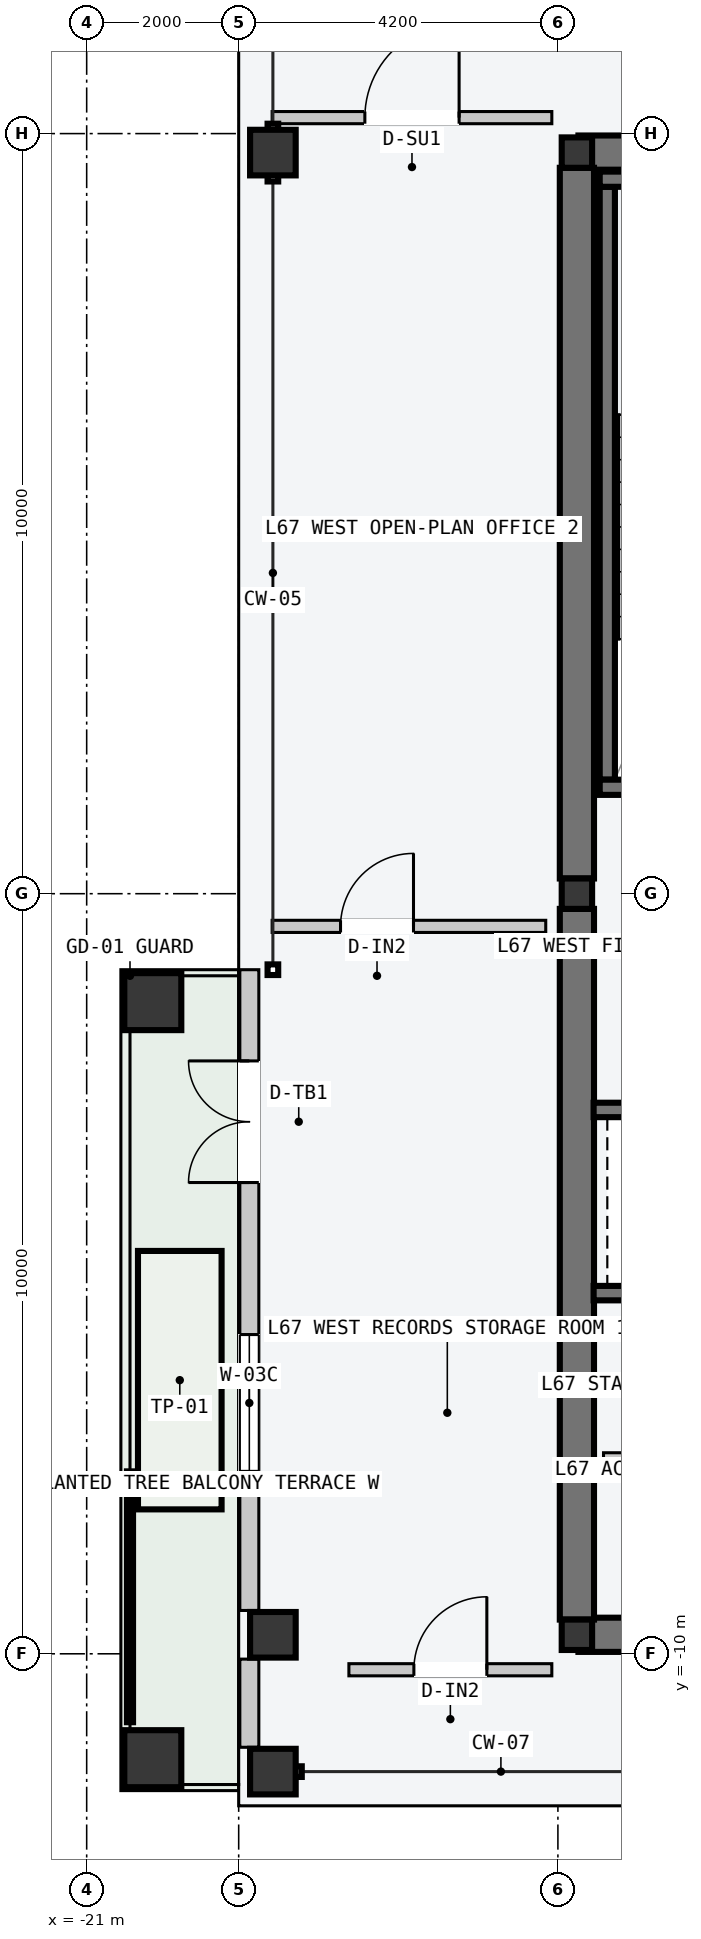
"""IFC4 building model, lengths in metres.
Left out: names, types, materials, properties, quantities, classifications, styles, units other than length and angle.
Written with IfcOpenShell. Run it as: python <this file> out.ifc"""

import sys

from ifc_helpers import new_model, si_unit, direction, frame, frame_2d, origin, origin_2d, place, context, subcontext, project, spatial, rectangle, hollow_rectangle, i_section, extrude, element, fill, save


model = new_model("IFC4")
c1 = context("Model", 3, precision=1e-05, world=origin(), true_north=direction((0.0, 1.0)))
c2 = subcontext(c1, "Body", "Model", "MODEL_VIEW")
j1 = project(units=[si_unit("LENGTHUNIT", "METRE"), si_unit("PLANEANGLEUNIT", "RADIAN")], contexts=[c1])
p1 = place(None, origin())
s1 = spatial("IfcSite", under=j1, at=p1, CompositionType="ELEMENT")
p2 = place(p1, origin())
s2 = spatial("IfcBuilding", under=s1, at=p2, CompositionType="ELEMENT")
p3 = place(p2, frame((0.0, 0.0, 254.4)))
s3 = spatial("IfcBuildingStorey", under=s2, at=p3, CompositionType="ELEMENT", Elevation=254.4)
for number, where, z_axis, x_axis in (
    (1, (-14.53, -9.75, -0.2), (0.0, 0.0, 1.0), (1.0, 0.0, 0.0)),
    (2, (-14.53, 9.75, -0.2), (0.0, 0.0, 1.0), (1.0, 0.0, 0.0)),
):
    element("IfcWall", number, at=place(p3, frame(where, z_axis=z_axis, x_axis=x_axis)), inside=s3, PredefinedType="SHEAR", context=c2, shape_type="SweptSolid", body=[
        extrude(rectangle(XDim=6.46, YDim=0.45, at=frame_2d((3.23, 0.0))), origin(), (0.0, 0.0, 1.0), 3.6),
    ])
for number, where, z_axis, x_axis in (
    (3, (-14.55, -9.55, -0.2), (0.0, 0.0, 1.0), (0.0, 1.0, 0.0)),
    (4, (-14.55, 0.2, -0.2), (0.0, 0.0, 1.0), (0.0, 1.0, 0.0)),
):
    element("IfcWall", number, at=place(p3, frame(where, z_axis=z_axis, x_axis=x_axis)), inside=s3, PredefinedType="SHEAR", context=c2, shape_type="SweptSolid", body=[
        extrude(rectangle(XDim=9.35, YDim=0.45, at=frame_2d((4.675, 0.0))), origin(), (0.0, 0.0, 1.0), 3.6),
    ])
p4 = place(p3, frame((-14.15, 1.5, -0.2), z_axis=(0.0, 0.0, 1.0), x_axis=(0.0, 1.0, 0.0)))
e5 = element("IfcWall", 5, at=p4, inside=s3, PredefinedType="SOLIDWALL", context=c2, shape_type="SweptSolid", body=[
    extrude(rectangle(XDim=7.8, YDim=0.2, at=frame_2d((3.9, 0.0))), origin(), (0.0, 0.0, 1.0), 3.6),
])
p5 = place(p3, frame((-14.25, 1.4, -0.2), z_axis=(0.0, 0.0, 1.0), x_axis=(1.0, 0.0, 0.0)))
e6 = element("IfcWall", 6, at=p5, inside=s3, PredefinedType="SOLIDWALL", context=c2, shape_type="SweptSolid", body=[
    extrude(rectangle(XDim=3.72, YDim=0.2, at=frame_2d((1.86, 0.0))), origin(), (0.0, 0.0, 1.0), 3.6),
])
p6 = place(p5, frame((1.5, 0.0, 0.2)))
e7 = element("IfcOpeningElement", 7, at=p6, cuts=e6, PredefinedType="OPENING", context=c2, shape_type="SweptSolid", body=[
    extrude(rectangle(XDim=1.12, YDim=2.18, at=frame_2d((0.56, 1.09))), frame((0.0, 0.11, 0.0), z_axis=(0.0, -1.0, 0.0), x_axis=(1.0, 0.0, 0.0)), (0.0, 0.0, 1.0), 0.22),
])
p7 = place(p3, frame((-14.25, 9.4, -0.2), z_axis=(0.0, 0.0, 1.0), x_axis=(1.0, 0.0, 0.0)))
e8 = element("IfcWall", 8, at=p7, inside=s3, PredefinedType="SOLIDWALL", context=c2, shape_type="SweptSolid", body=[
    extrude(rectangle(XDim=3.72, YDim=0.2, at=frame_2d((1.86, 0.0))), origin(), (0.0, 0.0, 1.0), 3.6),
])
for number, where, z_axis, x_axis in (
    (9, (-14.55, -9.75, 0.0), (0.0, 0.0, 1.0), (1.0, 0.0, 0.0)),
    (10, (-14.55, 0.0, 0.0), (0.0, 0.0, 1.0), (1.0, 0.0, 0.0)),
    (11, (-14.55, 9.75, 0.0), (0.0, 0.0, 1.0), (1.0, 0.0, 0.0)),
):
    element("IfcColumn", number, at=place(p3, frame(where, z_axis=z_axis, x_axis=x_axis)), inside=s3, PredefinedType="COLUMN", context=c2, shape_type="SweptSolid", body=[
        extrude(i_section(OverallWidth=0.4, OverallDepth=0.4, WebThickness=0.013, FlangeThickness=0.021, at=origin_2d()), origin(), (0.0, 0.0, 1.0), 3.6),
    ])
for number, where, z_axis, x_axis in (
    (12, (-18.55, -11.55, 0.0), (0.0, 0.0, 1.0), (0.0, 1.0, 0.0)),
    (13, (-18.55, -9.75, 0.0), (0.0, 0.0, 1.0), (0.0, 1.0, 0.0)),
    (14, (-18.55, 9.75, 0.0), (0.0, 0.0, 1.0), (0.0, 1.0, 0.0)),
):
    element("IfcColumn", number, at=place(p3, frame(where, z_axis=z_axis, x_axis=x_axis)), inside=s3, PredefinedType="COLUMN", context=c2, shape_type="SweptSolid", body=[
        extrude(hollow_rectangle(XDim=0.6, YDim=0.6, WallThickness=0.025, at=origin_2d()), origin(), (0.0, 0.0, 1.0), 3.6),
    ])
for number, where, z_axis, x_axis in (
    (15, (-20.13, -11.38, 0.0), (0.0, 0.0, 1.0), (0.0, 1.0, 0.0)),
    (16, (-20.13, -1.42, 0.0), (0.0, 0.0, 1.0), (0.0, 1.0, 0.0)),
):
    element("IfcColumn", number, at=place(p3, frame(where, z_axis=z_axis, x_axis=x_axis)), inside=s3, PredefinedType="COLUMN", context=c2, shape_type="SweptSolid", body=[
        extrude(hollow_rectangle(XDim=0.75, YDim=0.75, WallThickness=0.032, at=origin_2d()), origin(), (0.0, 0.0, 1.0), 3.6),
    ])
p8 = place(p3, frame((-18.86, -11.23, 0.0), z_axis=(0.0, 0.0, 1.0), x_axis=(0.0, 1.0, 0.0)))
e17 = element("IfcWall", 17, at=p8, inside=s3, PredefinedType="STANDARD", context=c2, shape_type="SweptSolid", body=[
    extrude(rectangle(XDim=1.16, YDim=0.25, at=frame_2d((0.58, 0.0))), origin(), (0.0, 0.0, 1.0), 3.4),
])
p9 = place(p3, frame((-18.86, -9.43, 0.0), z_axis=(0.0, 0.0, 1.0), x_axis=(0.0, 1.0, 0.0)))
e18 = element("IfcWall", 18, at=p9, inside=s3, PredefinedType="STANDARD", context=c2, shape_type="SweptSolid", body=[
    extrude(rectangle(XDim=8.43, YDim=0.25, at=frame_2d((4.215, 0.0))), origin(), (0.0, 0.0, 1.0), 3.4),
])
p10 = place(p9, frame((5.63, 0.0, 0.0)))
e19 = element("IfcOpeningElement", 19, at=p10, cuts=e18, PredefinedType="OPENING", context=c2, shape_type="SweptSolid", body=[
    extrude(rectangle(XDim=1.6, YDim=2.2, at=frame_2d((0.8, 1.1))), frame((0.0, 0.135, 0.0), z_axis=(0.0, -1.0, 0.0), x_axis=(1.0, 0.0, 0.0)), (0.0, 0.0, 1.0), 0.27),
])
p11 = place(p9, frame((1.83, 0.0, 0.85)))
e20 = element("IfcOpeningElement", 20, at=p11, cuts=e18, PredefinedType="OPENING", context=c2, shape_type="SweptSolid", body=[
    extrude(rectangle(XDim=1.8, YDim=2.05, at=frame_2d((0.9, 1.025))), frame((0.0, 0.135, 0.0), z_axis=(0.0, -1.0, 0.0), x_axis=(1.0, 0.0, 0.0)), (0.0, 0.0, 1.0), 0.27),
])
p12 = place(p3, frame((-14.33, -2.845, -0.2), z_axis=(0.0, 0.0, 1.0), x_axis=(1.0, 0.0, 0.0)))
e21 = element("IfcWall", 21, at=p12, inside=s3, PredefinedType="SOLIDWALL", context=c2, shape_type="SweptSolid", body=[
    extrude(rectangle(XDim=2.68, YDim=0.19, at=frame_2d((1.34, 0.0))), origin(), (0.0, 0.0, 1.0), 3.6),
])
p13 = place(p12, frame((0.83, 0.0, 0.2)))
e22 = element("IfcOpeningElement", 22, at=p13, cuts=e21, PredefinedType="OPENING", context=c2, shape_type="SweptSolid", body=[
    extrude(rectangle(XDim=1.2, YDim=2.2, at=frame_2d((0.6, 1.1))), frame((0.0, 0.105, 0.0), z_axis=(0.0, -1.0, 0.0), x_axis=(1.0, 0.0, 0.0)), (0.0, 0.0, 1.0), 0.21),
])
p14 = place(p3, frame((-14.33, -5.255, -0.2), z_axis=(0.0, 0.0, 1.0), x_axis=(1.0, 0.0, 0.0)))
e23 = element("IfcWall", 23, at=p14, inside=s3, PredefinedType="SOLIDWALL", context=c2, shape_type="SweptSolid", body=[
    extrude(rectangle(XDim=2.68, YDim=0.19, at=frame_2d((1.34, 0.0))), origin(), (0.0, 0.0, 1.0), 3.6),
])
p15 = place(p3, frame((-11.7, -7.425, 0.0), z_axis=(0.0, 0.0, 1.0), x_axis=(-1.0, 0.0, 0.0)))
e24 = element("IfcWall", 24, at=p15, inside=s3, PredefinedType="PARTITIONING", context=c2, shape_type="SweptSolid", body=[
    extrude(rectangle(XDim=2.5, YDim=0.14, at=frame_2d((1.25, 0.0))), origin(), (0.0, 0.0, 1.0), 3.4),
])
p16 = place(p3, frame((-18.56, 10.21, 0.0), z_axis=(0.0, 0.0, 1.0), x_axis=(1.0, 0.0, 0.0)))
e25 = element("IfcWall", 25, at=p16, inside=s3, PredefinedType="PARTITIONING", context=c2, shape_type="SweptSolid", body=[
    extrude(rectangle(XDim=3.68, YDim=0.16, at=frame_2d((1.84, 0.0))), origin(), (0.0, 0.0, 1.0), 3.4),
])
p17 = place(p16, frame((1.22, 0.0, 0.0)))
e26 = element("IfcOpeningElement", 26, at=p17, cuts=e25, PredefinedType="OPENING", context=c2, shape_type="SweptSolid", body=[
    extrude(rectangle(XDim=1.24, YDim=2.24, at=frame_2d((0.62, 1.12))), frame((0.0, 0.09, 0.0), z_axis=(0.0, -1.0, 0.0), x_axis=(1.0, 0.0, 0.0)), (0.0, 0.0, 1.0), 0.18),
])
p18 = place(p3, frame((-17.55, -10.21, 0.0), z_axis=(0.0, 0.0, 1.0), x_axis=(1.0, 0.0, 0.0)))
e27 = element("IfcWall", 27, at=p18, inside=s3, PredefinedType="PARTITIONING", context=c2, shape_type="SweptSolid", body=[
    extrude(rectangle(XDim=2.67, YDim=0.16, at=frame_2d((1.335, 0.0))), origin(), (0.0, 0.0, 1.0), 3.4),
])
p19 = place(p18, frame((0.855, 0.0, 0.0)))
e28 = element("IfcOpeningElement", 28, at=p19, cuts=e27, PredefinedType="OPENING", context=c2, shape_type="SweptSolid", body=[
    extrude(rectangle(XDim=0.96, YDim=2.18, at=frame_2d((0.48, 1.09))), frame((0.0, 0.09, 0.0), z_axis=(0.0, -1.0, 0.0), x_axis=(1.0, 0.0, 0.0)), (0.0, 0.0, 1.0), 0.18),
])
p20 = place(p3, frame((-18.56, -0.43, 0.0), z_axis=(0.0, 0.0, 1.0), x_axis=(1.0, 0.0, 0.0)))
e29 = element("IfcWall", 29, at=p20, inside=s3, PredefinedType="PARTITIONING", context=c2, shape_type="SweptSolid", body=[
    extrude(rectangle(XDim=3.6, YDim=0.16, at=frame_2d((1.8, 0.0))), origin(), (0.0, 0.0, 1.0), 3.4),
])
p21 = place(p20, frame((0.9, 0.0, 0.0)))
e30 = element("IfcOpeningElement", 30, at=p21, cuts=e29, PredefinedType="OPENING", context=c2, shape_type="SweptSolid", body=[
    extrude(rectangle(XDim=0.96, YDim=2.18, at=frame_2d((0.48, 1.09))), frame((0.0, 0.09, 0.0), z_axis=(0.0, -1.0, 0.0), x_axis=(1.0, 0.0, 0.0)), (0.0, 0.0, 1.0), 0.18),
])
p22 = place(p10, origin())
e31 = element("IfcDoor", 31, at=p22, inside=s3, OperationType="DOUBLE_DOOR_SINGLE_SWING", PredefinedType="DOOR", context=c2, shape_type="SweptSolid", body=[
    extrude(rectangle(XDim=1.6, YDim=2.2, at=frame_2d((0.8, 1.1))), frame((0.0, 0.025, 0.0), z_axis=(0.0, -1.0, 0.0), x_axis=(1.0, 0.0, 0.0)), (0.0, 0.0, 1.0), 0.05),
])
fill(e19, e31)
p23 = place(p11, origin())
e32 = element("IfcWindow", 32, at=p23, inside=s3, PartitioningType="SINGLE_PANEL", PredefinedType="WINDOW", context=c2, shape_type="SweptSolid", body=[
    extrude(rectangle(XDim=1.8, YDim=2.05, at=frame_2d((0.9, 1.025))), frame((0.0, 0.03, 0.0), z_axis=(0.0, -1.0, 0.0), x_axis=(1.0, 0.0, 0.0)), (0.0, 0.0, 1.0), 0.06),
])
fill(e20, e32)
p24 = place(p17, origin())
e33 = element("IfcDoor", 33, at=p24, inside=s3, OperationType="SINGLE_SWING_RIGHT", PredefinedType="DOOR", context=c2, shape_type="SweptSolid", body=[
    extrude(rectangle(XDim=1.24, YDim=2.24, at=frame_2d((0.62, 1.12))), frame((0.0, 0.025, 0.0), z_axis=(0.0, -1.0, 0.0), x_axis=(1.0, 0.0, 0.0)), (0.0, 0.0, 1.0), 0.05),
])
fill(e26, e33)
p25 = place(p19, origin())
e34 = element("IfcDoor", 34, at=p25, inside=s3, OperationType="SINGLE_SWING_RIGHT", PredefinedType="DOOR", context=c2, shape_type="SweptSolid", body=[
    extrude(rectangle(XDim=0.96, YDim=2.18, at=frame_2d((0.48, 1.09))), frame((0.0, 0.025, 0.0), z_axis=(0.0, -1.0, 0.0), x_axis=(1.0, 0.0, 0.0)), (0.0, 0.0, 1.0), 0.05),
])
fill(e28, e34)
p26 = place(p21, origin())
e35 = element("IfcDoor", 35, at=p26, inside=s3, OperationType="SINGLE_SWING_RIGHT", PredefinedType="DOOR", context=c2, shape_type="SweptSolid", body=[
    extrude(rectangle(XDim=0.96, YDim=2.18, at=frame_2d((0.48, 1.09))), frame((0.0, 0.025, 0.0), z_axis=(0.0, -1.0, 0.0), x_axis=(1.0, 0.0, 0.0)), (0.0, 0.0, 1.0), 0.05),
])
fill(e30, e35)
save(model, sys.argv[1])
